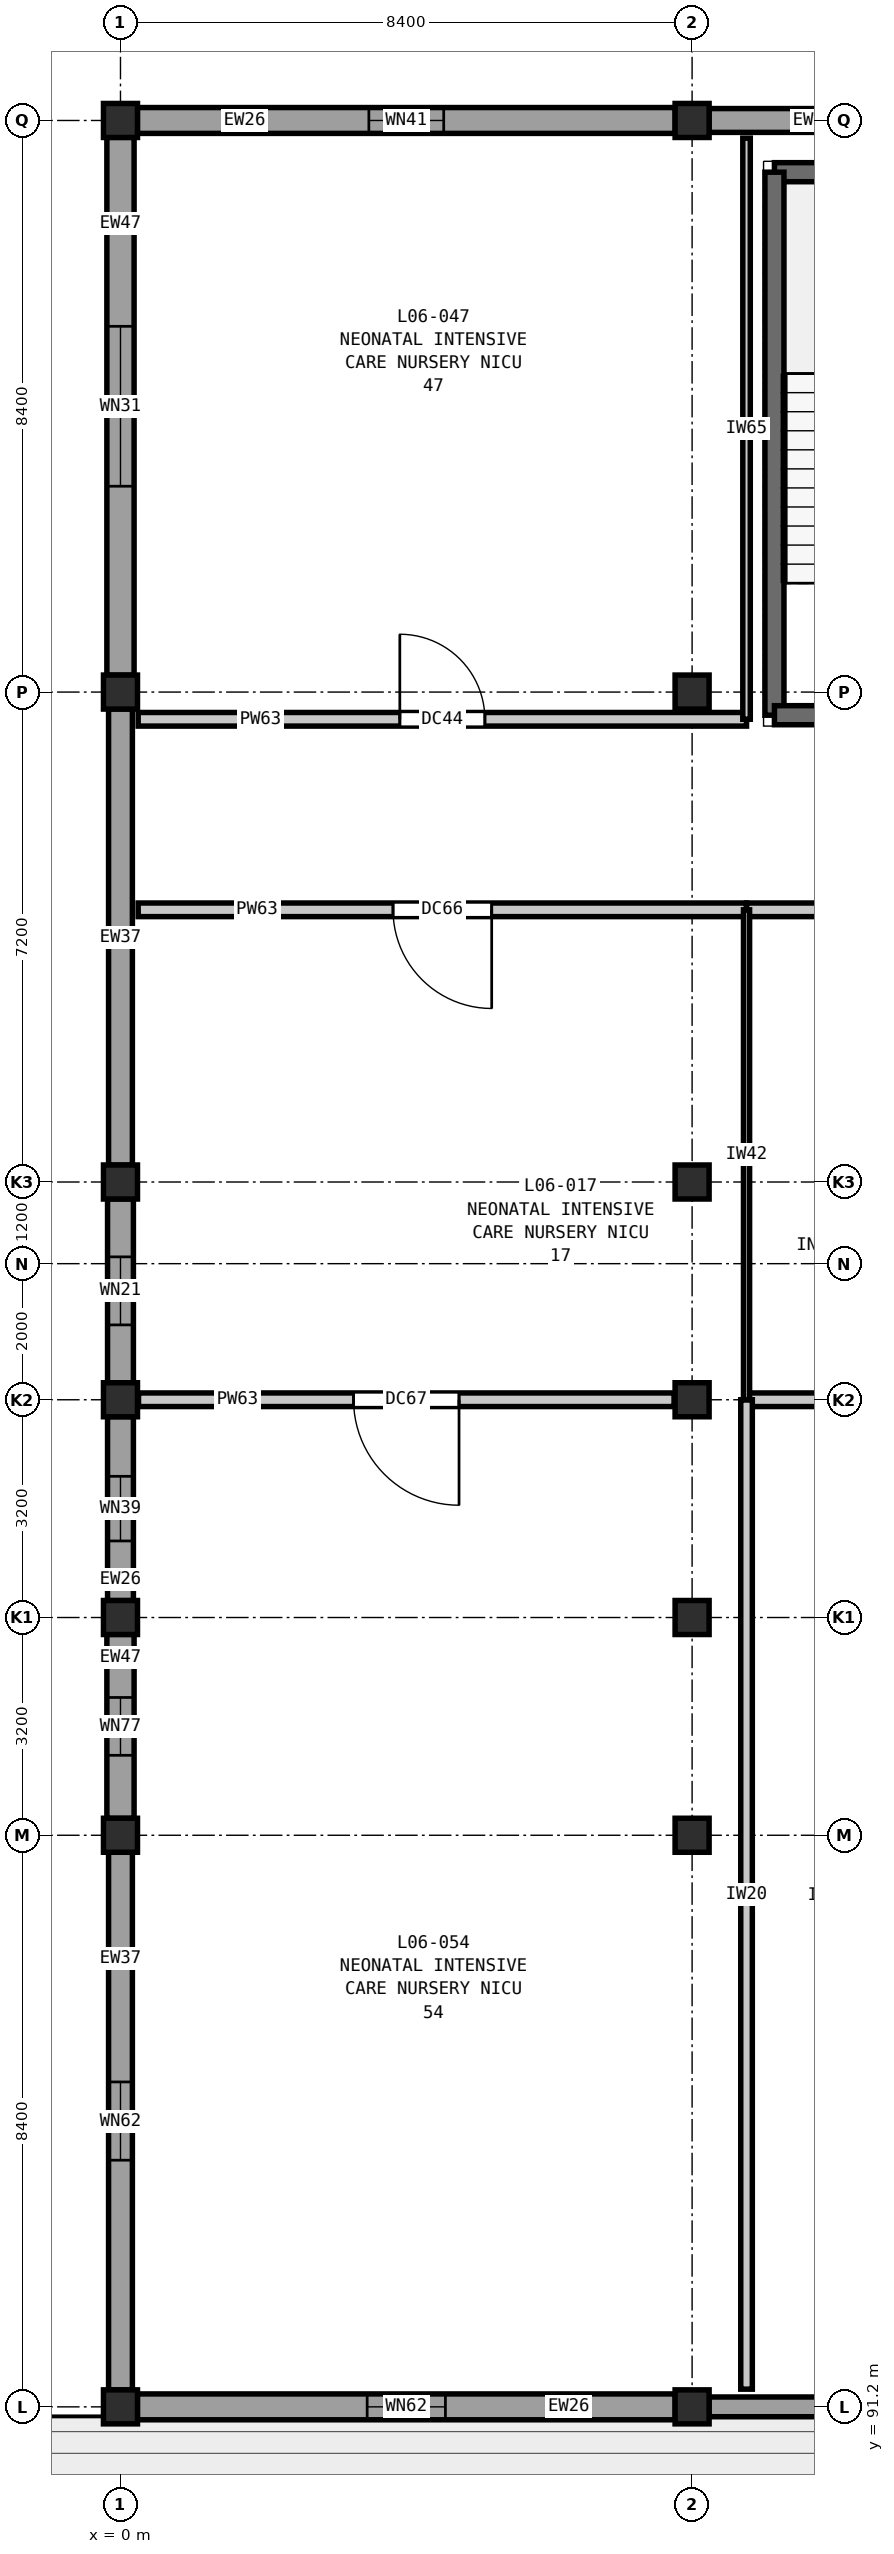
"""IFC4 building model, lengths in metres.
Left out: names, types, materials, properties, quantities, classifications, styles, units other than length and angle.
Written with IfcOpenShell. Run it as: python <this file> out.ifc"""

import sys

from ifc_helpers import new_model, si_unit, direction, frame, frame_2d, origin, origin_2d, place, context, subcontext, project, spatial, rectangle, extrude, element, fill, save


model = new_model("IFC4")
c1 = context("Model", 3, precision=1e-05, world=origin(), true_north=direction((0.0, 1.0)))
c2 = subcontext(c1, "Body", "Model", "MODEL_VIEW")
j1 = project(units=[si_unit("LENGTHUNIT", "METRE"), si_unit("PLANEANGLEUNIT", "RADIAN")], contexts=[c1])
p1 = place(None, origin())
s1 = spatial("IfcSite", under=j1, at=p1, CompositionType="ELEMENT")
p2 = place(p1, origin())
s2 = spatial("IfcBuilding", under=s1, at=p2, CompositionType="ELEMENT")
p3 = place(p2, frame((0.0, 0.0, 28.8)))
s3 = spatial("IfcBuildingStorey", under=s2, at=p3, CompositionType="ELEMENT", Elevation=28.8)
for number, where, z_axis, x_axis in (
    (1, (0.0, 91.2, 0.0), (0.0, 0.0, 1.0), (1.0, 0.0, 0.0)),
    (2, (0.0, 99.6, 0.0), (0.0, 0.0, 1.0), (1.0, 0.0, 0.0)),
    (3, (0.0, 102.8, 0.0), (0.0, 0.0, 1.0), (1.0, 0.0, 0.0)),
    (4, (0.0, 106.0, 0.0), (0.0, 0.0, 1.0), (1.0, 0.0, 0.0)),
    (5, (0.0, 109.2, 0.0), (0.0, 0.0, 1.0), (1.0, 0.0, 0.0)),
    (6, (0.0, 116.4, 0.0), (0.0, 0.0, 1.0), (1.0, 0.0, 0.0)),
    (7, (0.0, 124.8, 0.0), (0.0, 0.0, 1.0), (1.0, 0.0, 0.0)),
    (8, (8.4, 91.2, 0.0), (0.0, 0.0, 1.0), (1.0, 0.0, 0.0)),
    (9, (8.4, 99.6, 0.0), (0.0, 0.0, 1.0), (1.0, 0.0, 0.0)),
    (10, (8.4, 102.8, 0.0), (0.0, 0.0, 1.0), (1.0, 0.0, 0.0)),
    (11, (8.4, 106.0, 0.0), (0.0, 0.0, 1.0), (1.0, 0.0, 0.0)),
    (12, (8.4, 109.2, 0.0), (0.0, 0.0, 1.0), (1.0, 0.0, 0.0)),
    (13, (8.4, 116.4, 0.0), (0.0, 0.0, 1.0), (1.0, 0.0, 0.0)),
    (14, (8.4, 124.8, 0.0), (0.0, 0.0, 1.0), (1.0, 0.0, 0.0)),
):
    element("IfcColumn", number, at=place(p3, frame(where, z_axis=z_axis, x_axis=x_axis)), inside=s3, PredefinedType="COLUMN", context=c2, shape_type="SweptSolid", body=[
        extrude(rectangle(XDim=0.5, YDim=0.5, at=origin_2d()), origin(), (0.0, 0.0, 1.0), 4.2),
    ])
p4 = place(p3, frame((0.0, 106.248, 0.0), z_axis=(0.0, 0.0, 1.0), x_axis=(0.0, 1.0, 0.0)))
e15 = element("IfcWall", 15, at=p4, inside=s3, PredefinedType="SOLIDWALL", context=c2, shape_type="SweptSolid", body=[
    extrude(rectangle(XDim=2.704, YDim=0.38, at=frame_2d((1.352, 0.0))), origin(), (0.0, 0.0, 1.0), 3.48),
])
p5 = place(p4, frame((0.852, 0.0, 0.9)))
e16 = element("IfcOpeningElement", 16, at=p5, cuts=e15, PredefinedType="OPENING", context=c2, shape_type="SweptSolid", body=[
    extrude(rectangle(XDim=1.0, YDim=1.55, at=frame_2d((0.5, 0.775))), frame((0.0, 0.2, 0.0), z_axis=(0.0, -1.0, 0.0), x_axis=(1.0, 0.0, 0.0)), (0.0, 0.0, 1.0), 0.4),
])
p6 = place(p3, frame((0.0, 109.448, 0.0), z_axis=(0.0, 0.0, 1.0), x_axis=(0.0, 1.0, 0.0)))
e17 = element("IfcWall", 17, at=p6, inside=s3, PredefinedType="SOLIDWALL", context=c2, shape_type="SweptSolid", body=[
    extrude(rectangle(XDim=6.704, YDim=0.35, at=frame_2d((3.352, 0.0))), origin(), (0.0, 0.0, 1.0), 3.48),
])
p7 = place(p3, frame((0.0, 116.648, 0.0), z_axis=(0.0, 0.0, 1.0), x_axis=(0.0, 1.0, 0.0)))
e18 = element("IfcWall", 18, at=p7, inside=s3, PredefinedType="SOLIDWALL", context=c2, shape_type="SweptSolid", body=[
    extrude(rectangle(XDim=7.904, YDim=0.4, at=frame_2d((3.952, 0.0))), origin(), (0.0, 0.0, 1.0), 3.48),
])
p8 = place(p7, frame((2.777, 0.0, 0.9)))
e19 = element("IfcOpeningElement", 19, at=p8, cuts=e18, PredefinedType="OPENING", context=c2, shape_type="SweptSolid", body=[
    extrude(rectangle(XDim=2.35, YDim=1.75, at=frame_2d((1.175, 0.875))), frame((0.0, 0.21, 0.0), z_axis=(0.0, -1.0, 0.0), x_axis=(1.0, 0.0, 0.0)), (0.0, 0.0, 1.0), 0.42),
])
p9 = place(p3, frame((0.248, 124.8, 0.0), z_axis=(0.0, 0.0, 1.0), x_axis=(1.0, 0.0, 0.0)))
e20 = element("IfcWall", 20, at=p9, inside=s3, PredefinedType="SOLIDWALL", context=c2, shape_type="SweptSolid", body=[
    extrude(rectangle(XDim=7.904, YDim=0.38, at=frame_2d((3.952, 0.0))), origin(), (0.0, 0.0, 1.0), 3.48),
])
p10 = place(p9, frame((3.402, 0.0, 0.9)))
e21 = element("IfcOpeningElement", 21, at=p10, cuts=e20, PredefinedType="OPENING", context=c2, shape_type="SweptSolid", body=[
    extrude(rectangle(XDim=1.1, YDim=1.95, at=frame_2d((0.55, 0.975))), frame((0.0, 0.2, 0.0), z_axis=(0.0, -1.0, 0.0), x_axis=(1.0, 0.0, 0.0)), (0.0, 0.0, 1.0), 0.4),
])
p11 = place(p3, frame((8.648, 124.8, 0.0), z_axis=(0.0, 0.0, 1.0), x_axis=(1.0, 0.0, 0.0)))
e22 = element("IfcWall", 22, at=p11, inside=s3, PredefinedType="SOLIDWALL", context=c2, shape_type="SweptSolid", body=[
    extrude(rectangle(XDim=7.904, YDim=0.35, at=frame_2d((3.952, 0.0))), origin(), (0.0, 0.0, 1.0), 3.48),
])
p12 = place(p11, frame((3.327, 0.0, 0.9)))
e23 = element("IfcOpeningElement", 23, at=p12, cuts=e22, PredefinedType="OPENING", context=c2, shape_type="SweptSolid", body=[
    extrude(rectangle(XDim=1.25, YDim=1.95, at=frame_2d((0.625, 0.975))), frame((0.0, 0.185, 0.0), z_axis=(0.0, -1.0, 0.0), x_axis=(1.0, 0.0, 0.0)), (0.0, 0.0, 1.0), 0.37),
])
p13 = place(p3, frame((16.552, 91.2, 0.0), z_axis=(0.0, 0.0, 1.0), x_axis=(-1.0, 0.0, 0.0)))
e24 = element("IfcWall", 24, at=p13, inside=s3, PredefinedType="SOLIDWALL", context=c2, shape_type="SweptSolid", body=[
    extrude(rectangle(XDim=7.904, YDim=0.29, at=frame_2d((3.952, 0.0))), origin(), (0.0, 0.0, 1.0), 3.48),
])
p14 = place(p13, frame((4.665, 0.0, 0.9)))
e25 = element("IfcOpeningElement", 25, at=p14, cuts=e24, PredefinedType="OPENING", context=c2, shape_type="SweptSolid", body=[
    extrude(rectangle(XDim=1.15, YDim=1.4, at=frame_2d((0.575, 0.7))), frame((0.0, 0.155, 0.0), z_axis=(0.0, -1.0, 0.0), x_axis=(1.0, 0.0, 0.0)), (0.0, 0.0, 1.0), 0.31),
])
p15 = place(p3, frame((8.152, 91.2, 0.0), z_axis=(0.0, 0.0, 1.0), x_axis=(-1.0, 0.0, 0.0)))
e26 = element("IfcWall", 26, at=p15, inside=s3, PredefinedType="SOLIDWALL", context=c2, shape_type="SweptSolid", body=[
    extrude(rectangle(XDim=7.904, YDim=0.38, at=frame_2d((3.952, 0.0))), origin(), (0.0, 0.0, 1.0), 3.48),
])
p16 = place(p15, frame((3.377, 0.0, 0.9)))
e27 = element("IfcOpeningElement", 27, at=p16, cuts=e26, PredefinedType="OPENING", context=c2, shape_type="SweptSolid", body=[
    extrude(rectangle(XDim=1.15, YDim=1.4, at=frame_2d((0.575, 0.7))), frame((0.0, 0.2, 0.0), z_axis=(0.0, -1.0, 0.0), x_axis=(1.0, 0.0, 0.0)), (0.0, 0.0, 1.0), 0.4),
])
p17 = place(p3, frame((0.0, 91.448, 0.0), z_axis=(0.0, 0.0, 1.0), x_axis=(0.0, 1.0, 0.0)))
e28 = element("IfcWall", 28, at=p17, inside=s3, PredefinedType="SOLIDWALL", context=c2, shape_type="SweptSolid", body=[
    extrude(rectangle(XDim=7.904, YDim=0.35, at=frame_2d((3.952, 0.0))), origin(), (0.0, 0.0, 1.0), 3.48),
])
p18 = place(p17, frame((3.377, 0.0, 0.9)))
e29 = element("IfcOpeningElement", 29, at=p18, cuts=e28, PredefinedType="OPENING", context=c2, shape_type="SweptSolid", body=[
    extrude(rectangle(XDim=1.15, YDim=1.4, at=frame_2d((0.575, 0.7))), frame((0.0, 0.185, 0.0), z_axis=(0.0, -1.0, 0.0), x_axis=(1.0, 0.0, 0.0)), (0.0, 0.0, 1.0), 0.37),
])
p19 = place(p3, frame((0.0, 99.848, 0.0), z_axis=(0.0, 0.0, 1.0), x_axis=(0.0, 1.0, 0.0)))
e30 = element("IfcWall", 30, at=p19, inside=s3, PredefinedType="SOLIDWALL", context=c2, shape_type="SweptSolid", body=[
    extrude(rectangle(XDim=2.704, YDim=0.4, at=frame_2d((1.352, 0.0))), origin(), (0.0, 0.0, 1.0), 3.48),
])
p20 = place(p19, frame((0.927, 0.0, 0.9)))
e31 = element("IfcOpeningElement", 31, at=p20, cuts=e30, PredefinedType="OPENING", context=c2, shape_type="SweptSolid", body=[
    extrude(rectangle(XDim=0.85, YDim=1.4, at=frame_2d((0.425, 0.7))), frame((0.0, 0.21, 0.0), z_axis=(0.0, -1.0, 0.0), x_axis=(1.0, 0.0, 0.0)), (0.0, 0.0, 1.0), 0.42),
])
p21 = place(p3, frame((0.0, 103.048, 0.0), z_axis=(0.0, 0.0, 1.0), x_axis=(0.0, 1.0, 0.0)))
e32 = element("IfcWall", 32, at=p21, inside=s3, PredefinedType="SOLIDWALL", context=c2, shape_type="SweptSolid", body=[
    extrude(rectangle(XDim=2.704, YDim=0.38, at=frame_2d((1.352, 0.0))), origin(), (0.0, 0.0, 1.0), 3.48),
])
p22 = place(p21, frame((0.877, 0.0, 0.9)))
e33 = element("IfcOpeningElement", 33, at=p22, cuts=e32, PredefinedType="OPENING", context=c2, shape_type="SweptSolid", body=[
    extrude(rectangle(XDim=0.95, YDim=1.4, at=frame_2d((0.475, 0.7))), frame((0.0, 0.2, 0.0), z_axis=(0.0, -1.0, 0.0), x_axis=(1.0, 0.0, 0.0)), (0.0, 0.0, 1.0), 0.4),
])
p23 = place(p3, frame((13.69, 124.04, 0.0), z_axis=(0.0, 0.0, 1.0), x_axis=(-1.0, 0.0, 0.0)))
e34 = element("IfcWall", 34, at=p23, inside=s3, PredefinedType="SHEAR", context=c2, shape_type="SweptSolid", body=[
    extrude(rectangle(XDim=4.08, YDim=0.28, at=frame_2d((2.04, 0.0))), origin(), (0.0, 0.0, 1.0), 4.2),
])
p24 = place(p3, frame((9.61, 124.04, 0.0), z_axis=(0.0, 0.0, 1.0), x_axis=(0.0, -1.0, 0.0)))
e35 = element("IfcWall", 35, at=p24, inside=s3, PredefinedType="SHEAR", context=c2, shape_type="SweptSolid", body=[
    extrude(rectangle(XDim=7.98, YDim=0.28, at=frame_2d((3.99, 0.0))), origin(), (0.0, 0.0, 1.0), 4.2),
])
p25 = place(p3, frame((9.61, 116.06, 0.0), z_axis=(0.0, 0.0, 1.0), x_axis=(1.0, 0.0, 0.0)))
e36 = element("IfcWall", 36, at=p25, inside=s3, PredefinedType="SHEAR", context=c2, shape_type="SweptSolid", body=[
    extrude(rectangle(XDim=4.08, YDim=0.28, at=frame_2d((2.04, 0.0))), origin(), (0.0, 0.0, 1.0), 4.2),
])
p26 = place(p25, frame((1.34, 0.0, 0.0)))
e37 = element("IfcOpeningElement", 37, at=p26, cuts=e36, PredefinedType="OPENING", context=c2, shape_type="SweptSolid", body=[
    extrude(rectangle(XDim=1.4, YDim=2.2, at=frame_2d((0.7, 1.1))), frame((0.0, 0.15, 0.0), z_axis=(0.0, -1.0, 0.0), x_axis=(1.0, 0.0, 0.0)), (0.0, 0.0, 1.0), 0.3),
])
p27 = place(p3, frame((0.265, 106.0, 0.0), z_axis=(0.0, 0.0, 1.0), x_axis=(1.0, 0.0, 0.0)))
e38 = element("IfcWall", 38, at=p27, inside=s3, PredefinedType="PARTITIONING", context=c2, shape_type="SweptSolid", body=[
    extrude(rectangle(XDim=7.87, YDim=0.2, at=frame_2d((3.935, 0.0))), origin(), (0.0, 0.0, 1.0), 3.635),
])
p28 = place(p27, frame((3.16, 0.0, 0.0)))
e39 = element("IfcOpeningElement", 39, at=p28, cuts=e38, PredefinedType="OPENING", context=c2, shape_type="SweptSolid", body=[
    extrude(rectangle(XDim=1.55, YDim=2.25, at=frame_2d((0.775, 1.125))), frame((0.0, 0.11, 0.0), z_axis=(0.0, -1.0, 0.0), x_axis=(1.0, 0.0, 0.0)), (0.0, 0.0, 1.0), 0.22),
])
p29 = place(p3, frame((9.2, 106.0, 0.0), z_axis=(0.0, 0.0, 1.0), x_axis=(1.0, 0.0, 0.0)))
e40 = element("IfcWall", 40, at=p29, inside=s3, PredefinedType="PARTITIONING", context=c2, shape_type="SweptSolid", body=[
    extrude(rectangle(XDim=4.4, YDim=0.2, at=frame_2d((2.2, 0.0))), origin(), (0.0, 0.0, 1.0), 3.635),
])
p30 = place(p29, frame((1.35, 0.0, 0.0)))
e41 = element("IfcOpeningElement", 41, at=p30, cuts=e40, PredefinedType="OPENING", context=c2, shape_type="SweptSolid", body=[
    extrude(rectangle(XDim=1.7, YDim=2.3, at=frame_2d((0.85, 1.15))), frame((0.0, 0.11, 0.0), z_axis=(0.0, -1.0, 0.0), x_axis=(1.0, 0.0, 0.0)), (0.0, 0.0, 1.0), 0.22),
])
p31 = place(p3, frame((0.26, 113.2, 0.0), z_axis=(0.0, 0.0, 1.0), x_axis=(1.0, 0.0, 0.0)))
e42 = element("IfcWall", 42, at=p31, inside=s3, PredefinedType="PARTITIONING", context=c2, shape_type="SweptSolid", body=[
    extrude(rectangle(XDim=8.94, YDim=0.2, at=frame_2d((4.47, 0.0))), origin(), (0.0, 0.0, 1.0), 3.92),
])
p32 = place(p31, frame((3.745, 0.0, 0.0)))
e43 = element("IfcOpeningElement", 43, at=p32, cuts=e42, PredefinedType="OPENING", context=c2, shape_type="SweptSolid", body=[
    extrude(rectangle(XDim=1.45, YDim=2.25, at=frame_2d((0.725, 1.125))), frame((0.0, 0.11, 0.0), z_axis=(0.0, -1.0, 0.0), x_axis=(1.0, 0.0, 0.0)), (0.0, 0.0, 1.0), 0.22),
])
p33 = place(p3, frame((9.2, 113.2, 0.0), z_axis=(0.0, 0.0, 1.0), x_axis=(1.0, 0.0, 0.0)))
e44 = element("IfcWall", 44, at=p33, inside=s3, PredefinedType="PARTITIONING", context=c2, shape_type="SweptSolid", body=[
    extrude(rectangle(XDim=4.4, YDim=0.2, at=frame_2d((2.2, 0.0))), origin(), (0.0, 0.0, 1.0), 3.92),
])
p34 = place(p33, frame((1.425, 0.0, 0.0)))
e45 = element("IfcOpeningElement", 45, at=p34, cuts=e44, PredefinedType="OPENING", context=c2, shape_type="SweptSolid", body=[
    extrude(rectangle(XDim=1.55, YDim=2.25, at=frame_2d((0.775, 1.125))), frame((0.0, 0.11, 0.0), z_axis=(0.0, -1.0, 0.0), x_axis=(1.0, 0.0, 0.0)), (0.0, 0.0, 1.0), 0.22),
])
p35 = place(p3, frame((0.26, 116.0, 0.0), z_axis=(0.0, 0.0, 1.0), x_axis=(1.0, 0.0, 0.0)))
e46 = element("IfcWall", 46, at=p35, inside=s3, PredefinedType="PARTITIONING", context=c2, shape_type="SweptSolid", body=[
    extrude(rectangle(XDim=8.94, YDim=0.2, at=frame_2d((4.47, 0.0))), origin(), (0.0, 0.0, 1.0), 3.92),
])
p36 = place(p35, frame((3.845, 0.0, 0.0)))
e47 = element("IfcOpeningElement", 47, at=p36, cuts=e46, PredefinedType="OPENING", context=c2, shape_type="SweptSolid", body=[
    extrude(rectangle(XDim=1.25, YDim=2.15, at=frame_2d((0.625, 1.075))), frame((0.0, 0.11, 0.0), z_axis=(0.0, -1.0, 0.0), x_axis=(1.0, 0.0, 0.0)), (0.0, 0.0, 1.0), 0.22),
])
p37 = place(p3, frame((9.2, 91.46, 0.0), z_axis=(0.0, 0.0, 1.0), x_axis=(0.0, 1.0, 0.0)))
e48 = element("IfcWall", 48, at=p37, inside=s3, PredefinedType="PARTITIONING", context=c2, shape_type="SweptSolid", body=[
    extrude(rectangle(XDim=14.54, YDim=0.17, at=frame_2d((7.27, 0.0))), origin(), (0.0, 0.0, 1.0), 3.92),
])
p38 = place(p3, frame((9.2, 106.0, 0.0), z_axis=(0.0, 0.0, 1.0), x_axis=(0.0, 1.0, 0.0)))
e49 = element("IfcWall", 49, at=p38, inside=s3, PredefinedType="PARTITIONING", context=c2, shape_type="SweptSolid", body=[
    extrude(rectangle(XDim=7.2, YDim=0.09, at=frame_2d((3.6, 0.0))), origin(), (0.0, 0.0, 1.0), 3.92),
])
p39 = place(p3, frame((9.2, 116.0, 0.0), z_axis=(0.0, 0.0, 1.0), x_axis=(0.0, 1.0, 0.0)))
e50 = element("IfcWall", 50, at=p39, inside=s3, PredefinedType="PARTITIONING", context=c2, shape_type="SweptSolid", body=[
    extrude(rectangle(XDim=8.54, YDim=0.11, at=frame_2d((4.27, 0.0))), origin(), (0.0, 0.0, 1.0), 3.92),
])
p40 = place(p5, origin())
e51 = element("IfcWindow", 51, at=p40, inside=s3, PartitioningType="SINGLE_PANEL", PredefinedType="WINDOW", context=c2, shape_type="SweptSolid", body=[
    extrude(rectangle(XDim=1.0, YDim=1.55, at=frame_2d((0.5, 0.775))), frame((0.0, 0.03, 0.0), z_axis=(0.0, -1.0, 0.0), x_axis=(1.0, 0.0, 0.0)), (0.0, 0.0, 1.0), 0.06),
])
fill(e16, e51)
p41 = place(p8, origin())
e52 = element("IfcWindow", 52, at=p41, inside=s3, PartitioningType="DOUBLE_PANEL_VERTICAL", PredefinedType="WINDOW", context=c2, shape_type="SweptSolid", body=[
    extrude(rectangle(XDim=2.35, YDim=1.75, at=frame_2d((1.175, 0.875))), frame((0.0, 0.03, 0.0), z_axis=(0.0, -1.0, 0.0), x_axis=(1.0, 0.0, 0.0)), (0.0, 0.0, 1.0), 0.06),
])
fill(e19, e52)
p42 = place(p10, origin())
e53 = element("IfcWindow", 53, at=p42, inside=s3, PartitioningType="SINGLE_PANEL", PredefinedType="WINDOW", context=c2, shape_type="SweptSolid", body=[
    extrude(rectangle(XDim=1.1, YDim=1.95, at=frame_2d((0.55, 0.975))), frame((0.0, 0.03, 0.0), z_axis=(0.0, -1.0, 0.0), x_axis=(1.0, 0.0, 0.0)), (0.0, 0.0, 1.0), 0.06),
])
fill(e21, e53)
p43 = place(p16, origin())
e54 = element("IfcWindow", 54, at=p43, inside=s3, PartitioningType="SINGLE_PANEL", PredefinedType="WINDOW", context=c2, shape_type="SweptSolid", body=[
    extrude(rectangle(XDim=1.15, YDim=1.4, at=frame_2d((0.575, 0.7))), frame((0.0, 0.03, 0.0), z_axis=(0.0, -1.0, 0.0), x_axis=(1.0, 0.0, 0.0)), (0.0, 0.0, 1.0), 0.06),
])
fill(e27, e54)
p44 = place(p18, origin())
e55 = element("IfcWindow", 55, at=p44, inside=s3, PartitioningType="SINGLE_PANEL", PredefinedType="WINDOW", context=c2, shape_type="SweptSolid", body=[
    extrude(rectangle(XDim=1.15, YDim=1.4, at=frame_2d((0.575, 0.7))), frame((0.0, 0.03, 0.0), z_axis=(0.0, -1.0, 0.0), x_axis=(1.0, 0.0, 0.0)), (0.0, 0.0, 1.0), 0.06),
])
fill(e29, e55)
p45 = place(p20, origin())
e56 = element("IfcWindow", 56, at=p45, inside=s3, PartitioningType="SINGLE_PANEL", PredefinedType="WINDOW", context=c2, shape_type="SweptSolid", body=[
    extrude(rectangle(XDim=0.85, YDim=1.4, at=frame_2d((0.425, 0.7))), frame((0.0, 0.03, 0.0), z_axis=(0.0, -1.0, 0.0), x_axis=(1.0, 0.0, 0.0)), (0.0, 0.0, 1.0), 0.06),
])
fill(e31, e56)
p46 = place(p22, origin())
e57 = element("IfcWindow", 57, at=p46, inside=s3, PartitioningType="SINGLE_PANEL", PredefinedType="WINDOW", context=c2, shape_type="SweptSolid", body=[
    extrude(rectangle(XDim=0.95, YDim=1.4, at=frame_2d((0.475, 0.7))), frame((0.0, 0.03, 0.0), z_axis=(0.0, -1.0, 0.0), x_axis=(1.0, 0.0, 0.0)), (0.0, 0.0, 1.0), 0.06),
])
fill(e33, e57)
p47 = place(p28, frame((1.55, 0.0, 0.0), z_axis=(0.0, 0.0, 1.0), x_axis=(-1.0, 0.0, 0.0)))
e58 = element("IfcDoor", 58, at=p47, inside=s3, OperationType="SINGLE_SWING_LEFT", PredefinedType="DOOR", context=c2, shape_type="SweptSolid", body=[
    extrude(rectangle(XDim=1.55, YDim=2.25, at=frame_2d((0.775, 1.125))), frame((0.0, 0.025, 0.0), z_axis=(0.0, -1.0, 0.0), x_axis=(1.0, 0.0, 0.0)), (0.0, 0.0, 1.0), 0.05),
])
fill(e39, e58)
p48 = place(p32, frame((1.45, 0.0, 0.0), z_axis=(0.0, 0.0, 1.0), x_axis=(-1.0, 0.0, 0.0)))
e59 = element("IfcDoor", 59, at=p48, inside=s3, OperationType="SINGLE_SWING_LEFT", PredefinedType="DOOR", context=c2, shape_type="SweptSolid", body=[
    extrude(rectangle(XDim=1.45, YDim=2.25, at=frame_2d((0.725, 1.125))), frame((0.0, 0.025, 0.0), z_axis=(0.0, -1.0, 0.0), x_axis=(1.0, 0.0, 0.0)), (0.0, 0.0, 1.0), 0.05),
])
fill(e43, e59)
p49 = place(p36, origin())
e60 = element("IfcDoor", 60, at=p49, inside=s3, OperationType="SINGLE_SWING_LEFT", PredefinedType="DOOR", context=c2, shape_type="SweptSolid", body=[
    extrude(rectangle(XDim=1.25, YDim=2.15, at=frame_2d((0.625, 1.075))), frame((0.0, 0.025, 0.0), z_axis=(0.0, -1.0, 0.0), x_axis=(1.0, 0.0, 0.0)), (0.0, 0.0, 1.0), 0.05),
])
fill(e47, e60)
save(model, sys.argv[1])
